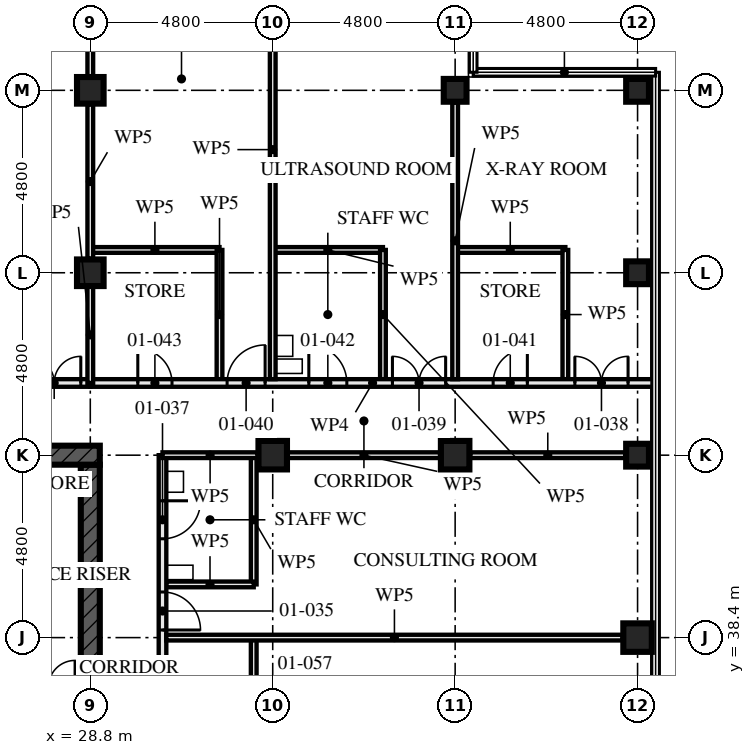
"""IFC4 building model, lengths in metres.
Left out: names, types, materials, properties, quantities, classifications, styles, units other than length and angle.
Written with IfcOpenShell. Run it as: python <this file> out.ifc"""

import sys

from ifc_helpers import new_model, si_unit, direction, frame, frame_2d, origin, origin_2d, place, context, subcontext, project, spatial, rectangle, hollow_rectangle, extrude, element, fill, save


model = new_model("IFC4")
c1 = context("Model", 3, precision=1e-05, world=origin(), true_north=direction((0.0, 1.0)))
c2 = subcontext(c1, "Body", "Model", "MODEL_VIEW")
j1 = project(units=[si_unit("LENGTHUNIT", "METRE"), si_unit("PLANEANGLEUNIT", "RADIAN")], contexts=[c1])
p1 = place(None, origin())
s1 = spatial("IfcSite", under=j1, at=p1, CompositionType="ELEMENT")
p2 = place(p1, origin())
s2 = spatial("IfcBuilding", under=s1, at=p2, CompositionType="ELEMENT")
p3 = place(p2, frame((0.0, 0.0, 4.5)))
s3 = spatial("IfcBuildingStorey", under=s2, at=p3, CompositionType="ELEMENT", Elevation=4.5)
for number, where, z_axis, x_axis in (
    (1, (28.8, 48.0, 0.0), (0.0, 0.0, 1.0), (1.0, 0.0, 0.0)),
    (2, (28.8, 52.8, 0.0), (0.0, 0.0, 1.0), (1.0, 0.0, 0.0)),
):
    element("IfcColumn", number, at=place(p3, frame(where, z_axis=z_axis, x_axis=x_axis)), inside=s3, PredefinedType="COLUMN", context=c2, shape_type="SweptSolid", body=[
        extrude(hollow_rectangle(XDim=0.7, YDim=0.7, WallThickness=0.06, at=origin_2d()), origin(), (0.0, 0.0, 1.0), 4.5),
    ])
for number, where, z_axis, x_axis in (
    (3, (33.6, 43.2, 0.0), (0.0, 0.0, 1.0), (0.0, 1.0, 0.0)),
    (4, (38.4, 43.2, 0.0), (0.0, 0.0, 1.0), (0.0, 1.0, 0.0)),
):
    element("IfcColumn", number, at=place(p3, frame(where, z_axis=z_axis, x_axis=x_axis)), inside=s3, PredefinedType="COLUMN", context=c2, shape_type="SweptSolid", body=[
        extrude(hollow_rectangle(XDim=0.75, YDim=0.75, WallThickness=0.08, at=origin_2d()), origin(), (0.0, 0.0, 1.0), 4.5),
    ])
p4 = place(p3, frame((38.4, 52.8, 0.0), z_axis=(0.0, 0.0, 1.0), x_axis=(0.0, 1.0, 0.0)))
e5 = element("IfcColumn", 5, at=p4, inside=s3, PredefinedType="COLUMN", context=c2, shape_type="SweptSolid", body=[
    extrude(hollow_rectangle(XDim=0.6, YDim=0.6, WallThickness=0.06, at=origin_2d()), origin(), (0.0, 0.0, 1.0), 4.5),
])
p5 = place(p3, frame((43.2, 38.4, 0.0), z_axis=(0.0, 0.0, 1.0), x_axis=(1.0, 0.0, 0.0)))
e6 = element("IfcColumn", 6, at=p5, inside=s3, PredefinedType="COLUMN", context=c2, shape_type="SweptSolid", body=[
    extrude(hollow_rectangle(XDim=0.75, YDim=0.75, WallThickness=0.08, at=origin_2d()), origin(), (0.0, 0.0, 1.0), 4.5),
])
for number, where, z_axis, x_axis in (
    (7, (43.2, 43.2, 0.0), (0.0, 0.0, 1.0), (0.0, 1.0, 0.0)),
    (8, (43.2, 48.0, 0.0), (0.0, 0.0, 1.0), (1.0, 0.0, 0.0)),
):
    element("IfcColumn", number, at=place(p3, frame(where, z_axis=z_axis, x_axis=x_axis)), inside=s3, PredefinedType="COLUMN", context=c2, shape_type="SweptSolid", body=[
        extrude(hollow_rectangle(XDim=0.6, YDim=0.6, WallThickness=0.08, at=origin_2d()), origin(), (0.0, 0.0, 1.0), 4.5),
    ])
p6 = place(p3, frame((43.2, 52.8, 0.0), z_axis=(0.0, 0.0, 1.0), x_axis=(0.0, 1.0, 0.0)))
e9 = element("IfcColumn", 9, at=p6, inside=s3, PredefinedType="COLUMN", context=c2, shape_type="SweptSolid", body=[
    extrude(hollow_rectangle(XDim=0.6, YDim=0.6, WallThickness=0.06, at=origin_2d()), origin(), (0.0, 0.0, 1.0), 4.5),
])
p7 = place(p3, frame((29.05, 43.2, -0.17), z_axis=(0.0, 0.0, 1.0), x_axis=(-1.0, 0.0, 0.0)))
e10 = element("IfcWall", 10, at=p7, inside=s3, PredefinedType="SHEAR", context=c2, shape_type="SweptSolid", body=[
    extrude(rectangle(XDim=14.9, YDim=0.5, at=frame_2d((7.45, 0.0))), origin(), (0.0, 0.0, 1.0), 4.5),
])
p8 = place(p7, frame((6.85, 0.0, 0.17)))
e11 = element("IfcOpeningElement", 11, at=p8, cuts=e10, PredefinedType="OPENING", context=c2, shape_type="SweptSolid", body=[
    extrude(rectangle(XDim=1.2, YDim=2.1, at=frame_2d((0.6, 1.05))), frame((0.0, 0.26, 0.0), z_axis=(0.0, -1.0, 0.0), x_axis=(1.0, 0.0, 0.0)), (0.0, 0.0, 1.0), 0.521),
])
p9 = place(p3, frame((28.8, 29.05, -0.17), z_axis=(0.0, 0.0, 1.0), x_axis=(0.0, 1.0, 0.0)))
e12 = element("IfcWall", 12, at=p9, inside=s3, PredefinedType="SHEAR", context=c2, shape_type="SweptSolid", body=[
    extrude(rectangle(XDim=13.9, YDim=0.5, at=frame_2d((6.95, 0.0))), origin(), (0.0, 0.0, 1.0), 4.5),
])
p10 = place(p9, frame((6.35, 0.0, 0.17)))
e13 = element("IfcOpeningElement", 13, at=p10, cuts=e12, PredefinedType="OPENING", context=c2, shape_type="SweptSolid", body=[
    extrude(rectangle(XDim=1.2, YDim=2.1, at=frame_2d((0.6, 1.05))), frame((0.0, 0.26, 0.0), z_axis=(0.0, -1.0, 0.0), x_axis=(1.0, 0.0, 0.0)), (0.0, 0.0, 1.0), 0.521),
])
p11 = place(p3, frame((28.8, 45.1, 0.0), z_axis=(0.0, 0.0, 1.0), x_axis=(-1.0, 0.0, 0.0)))
e14 = element("IfcWall", 14, at=p11, inside=s3, PredefinedType="PARTITIONING", context=c2, shape_type="SweptSolid", body=[
    extrude(rectangle(XDim=14.4, YDim=0.2, at=frame_2d((7.2, 0.0))), origin(), (0.0, 0.0, 1.0), 4.33),
])
p12 = place(p11, frame((0.25, 0.0, 0.0)))
e15 = element("IfcOpeningElement", 15, at=p12, cuts=e14, PredefinedType="OPENING", context=c2, shape_type="SweptSolid", body=[
    extrude(rectangle(XDim=1.4, YDim=2.4, at=frame_2d((0.7, 1.2))), frame((0.0, 0.111, 0.0), z_axis=(0.0, -1.0, 0.0), x_axis=(1.0, 0.0, 0.0)), (0.0, 0.0, 1.0), 0.221),
])
p13 = place(p11, frame((5.0, 0.0, 0.0)))
e16 = element("IfcOpeningElement", 16, at=p13, cuts=e14, PredefinedType="OPENING", context=c2, shape_type="SweptSolid", body=[
    extrude(rectangle(XDim=1.0, YDim=2.4, at=frame_2d((0.5, 1.2))), frame((0.0, 0.111, 0.0), z_axis=(0.0, -1.0, 0.0), x_axis=(1.0, 0.0, 0.0)), (0.0, 0.0, 1.0), 0.221),
])
p14 = place(p11, frame((9.8, 0.0, 0.0)))
e17 = element("IfcOpeningElement", 17, at=p14, cuts=e14, PredefinedType="OPENING", context=c2, shape_type="SweptSolid", body=[
    extrude(rectangle(XDim=1.0, YDim=2.4, at=frame_2d((0.5, 1.2))), frame((0.0, 0.111, 0.0), z_axis=(0.0, -1.0, 0.0), x_axis=(1.0, 0.0, 0.0)), (0.0, 0.0, 1.0), 0.221),
])
p15 = place(p11, frame((2.9, 0.0, 0.0)))
e18 = element("IfcOpeningElement", 18, at=p15, cuts=e14, PredefinedType="OPENING", context=c2, shape_type="SweptSolid", body=[
    extrude(rectangle(XDim=0.9, YDim=2.1, at=frame_2d((0.45, 1.05))), frame((0.0, 0.111, 0.0), z_axis=(0.0, -1.0, 0.0), x_axis=(1.0, 0.0, 0.0)), (0.0, 0.0, 1.0), 0.221),
])
p16 = place(p11, frame((7.4, 0.0, 0.0)))
e19 = element("IfcOpeningElement", 19, at=p16, cuts=e14, PredefinedType="OPENING", context=c2, shape_type="SweptSolid", body=[
    extrude(rectangle(XDim=1.0, YDim=2.1, at=frame_2d((0.5, 1.05))), frame((0.0, 0.111, 0.0), z_axis=(0.0, -1.0, 0.0), x_axis=(1.0, 0.0, 0.0)), (0.0, 0.0, 1.0), 0.221),
])
p17 = place(p11, frame((12.25, 0.0, 0.0)))
e20 = element("IfcOpeningElement", 20, at=p17, cuts=e14, PredefinedType="OPENING", context=c2, shape_type="SweptSolid", body=[
    extrude(rectangle(XDim=0.9, YDim=2.1, at=frame_2d((0.45, 1.05))), frame((0.0, 0.111, 0.0), z_axis=(0.0, -1.0, 0.0), x_axis=(1.0, 0.0, 0.0)), (0.0, 0.0, 1.0), 0.221),
])
p18 = place(p3, frame((33.1, 35.0, 0.0), z_axis=(0.0, 0.0, 1.0), x_axis=(0.0, 1.0, 0.0)))
e21 = element("IfcWall", 21, at=p18, inside=s3, PredefinedType="PARTITIONING", context=c2, shape_type="SweptSolid", body=[
    extrude(rectangle(XDim=3.4, YDim=0.15, at=frame_2d((1.7, 0.0))), origin(), (0.0, 0.0, 1.0), 4.33),
])
p19 = place(p3, frame((33.1, 39.8, 0.0), z_axis=(0.0, 0.0, 1.0), x_axis=(-1.0, 0.0, 0.0)))
e22 = element("IfcWall", 22, at=p19, inside=s3, PredefinedType="PARTITIONING", context=c2, shape_type="SweptSolid", body=[
    extrude(rectangle(XDim=2.3, YDim=0.15, at=frame_2d((1.15, 0.0))), origin(), (0.0, 0.0, 1.0), 4.33),
])
p20 = place(p3, frame((33.1, 39.8, 0.0), z_axis=(0.0, 0.0, 1.0), x_axis=(0.0, 1.0, 0.0)))
e23 = element("IfcWall", 23, at=p20, inside=s3, PredefinedType="PARTITIONING", context=c2, shape_type="SweptSolid", body=[
    extrude(rectangle(XDim=3.4, YDim=0.15, at=frame_2d((1.7, 0.0))), origin(), (0.0, 0.0, 1.0), 4.33),
])
p21 = place(p3, frame((42.805, 38.4, 0.0), z_axis=(0.0, 0.0, 1.0), x_axis=(-1.0, 0.0, 0.0)))
e24 = element("IfcWall", 24, at=p21, inside=s3, PredefinedType="PARTITIONING", context=c2, shape_type="SweptSolid", body=[
    extrude(rectangle(XDim=12.005, YDim=0.15, at=frame_2d((6.002, 0.0))), origin(), (0.0, 0.0, 1.0), 3.55),
])
p22 = place(p3, frame((30.7, 28.8, 0.0), z_axis=(0.0, 0.0, 1.0), x_axis=(0.0, 1.0, 0.0)))
e25 = element("IfcWall", 25, at=p22, inside=s3, PredefinedType="PARTITIONING", context=c2, shape_type="SweptSolid", body=[
    extrude(rectangle(XDim=14.4, YDim=0.2, at=frame_2d((7.2, 0.0))), origin(), (0.0, 0.0, 1.0), 3.55),
])
p23 = place(p22, frame((1.4, 0.0, 0.0)))
e26 = element("IfcOpeningElement", 26, at=p23, cuts=e25, PredefinedType="OPENING", context=c2, shape_type="SweptSolid", body=[
    extrude(rectangle(XDim=1.0, YDim=2.1, at=frame_2d((0.5, 1.05))), frame((0.0, 0.111, 0.0), z_axis=(0.0, -1.0, 0.0), x_axis=(1.0, 0.0, 0.0)), (0.0, 0.0, 1.0), 0.221),
])
p24 = place(p22, frame((3.6, 0.0, 0.0)))
e27 = element("IfcOpeningElement", 27, at=p24, cuts=e25, PredefinedType="OPENING", context=c2, shape_type="SweptSolid", body=[
    extrude(rectangle(XDim=1.0, YDim=2.4, at=frame_2d((0.5, 1.2))), frame((0.0, 0.111, 0.0), z_axis=(0.0, -1.0, 0.0), x_axis=(1.0, 0.0, 0.0)), (0.0, 0.0, 1.0), 0.221),
])
p25 = place(p22, frame((5.0, 0.0, 0.0)))
e28 = element("IfcOpeningElement", 28, at=p25, cuts=e25, PredefinedType="OPENING", context=c2, shape_type="SweptSolid", body=[
    extrude(rectangle(XDim=1.0, YDim=2.4, at=frame_2d((0.5, 1.2))), frame((0.0, 0.111, 0.0), z_axis=(0.0, -1.0, 0.0), x_axis=(1.0, 0.0, 0.0)), (0.0, 0.0, 1.0), 0.221),
])
p26 = place(p22, frame((9.8, 0.0, 0.0)))
e29 = element("IfcOpeningElement", 29, at=p26, cuts=e25, PredefinedType="OPENING", context=c2, shape_type="SweptSolid", body=[
    extrude(rectangle(XDim=1.0, YDim=2.4, at=frame_2d((0.5, 1.2))), frame((0.0, 0.111, 0.0), z_axis=(0.0, -1.0, 0.0), x_axis=(1.0, 0.0, 0.0)), (0.0, 0.0, 1.0), 0.221),
])
p27 = place(p22, frame((7.45, 0.0, 0.0)))
e30 = element("IfcOpeningElement", 30, at=p27, cuts=e25, PredefinedType="OPENING", context=c2, shape_type="SweptSolid", body=[
    extrude(rectangle(XDim=0.9, YDim=2.1, at=frame_2d((0.45, 1.05))), frame((0.0, 0.111, 0.0), z_axis=(0.0, -1.0, 0.0), x_axis=(1.0, 0.0, 0.0)), (0.0, 0.0, 1.0), 0.221),
])
p28 = place(p22, frame((12.2, 0.0, 0.0)))
e31 = element("IfcOpeningElement", 31, at=p28, cuts=e25, PredefinedType="OPENING", context=c2, shape_type="SweptSolid", body=[
    extrude(rectangle(XDim=1.0, YDim=2.1, at=frame_2d((0.5, 1.05))), frame((0.0, 0.111, 0.0), z_axis=(0.0, -1.0, 0.0), x_axis=(1.0, 0.0, 0.0)), (0.0, 0.0, 1.0), 0.221),
])
p29 = place(p3, frame((41.3, 48.6, 0.0), z_axis=(0.0, 0.0, 1.0), x_axis=(0.0, -1.0, 0.0)))
e32 = element("IfcWall", 32, at=p29, inside=s3, PredefinedType="PARTITIONING", context=c2, shape_type="SweptSolid", body=[
    extrude(rectangle(XDim=3.4, YDim=0.15, at=frame_2d((1.7, 0.0))), origin(), (0.0, 0.0, 1.0), 3.32),
])
p30 = place(p3, frame((41.3, 48.6, 0.0), z_axis=(0.0, 0.0, 1.0), x_axis=(-1.0, 0.0, 0.0)))
e33 = element("IfcWall", 33, at=p30, inside=s3, PredefinedType="PARTITIONING", context=c2, shape_type="SweptSolid", body=[
    extrude(rectangle(XDim=2.9, YDim=0.15, at=frame_2d((1.45, 0.0))), origin(), (0.0, 0.0, 1.0), 4.33),
])
p31 = place(p3, frame((36.5, 48.6, 0.0), z_axis=(0.0, 0.0, 1.0), x_axis=(0.0, -1.0, 0.0)))
e34 = element("IfcWall", 34, at=p31, inside=s3, PredefinedType="PARTITIONING", context=c2, shape_type="SweptSolid", body=[
    extrude(rectangle(XDim=3.4, YDim=0.15, at=frame_2d((1.7, 0.0))), origin(), (0.0, 0.0, 1.0), 3.32),
])
p32 = place(p3, frame((36.5, 48.6, 0.0), z_axis=(0.0, 0.0, 1.0), x_axis=(-1.0, 0.0, 0.0)))
e35 = element("IfcWall", 35, at=p32, inside=s3, PredefinedType="PARTITIONING", context=c2, shape_type="SweptSolid", body=[
    extrude(rectangle(XDim=2.9, YDim=0.15, at=frame_2d((1.45, 0.0))), origin(), (0.0, 0.0, 1.0), 4.33),
])
p33 = place(p3, frame((32.2, 48.6, 0.0), z_axis=(0.0, 0.0, 1.0), x_axis=(0.0, -1.0, 0.0)))
e36 = element("IfcWall", 36, at=p33, inside=s3, PredefinedType="PARTITIONING", context=c2, shape_type="SweptSolid", body=[
    extrude(rectangle(XDim=3.4, YDim=0.15, at=frame_2d((1.7, 0.0))), origin(), (0.0, 0.0, 1.0), 3.32),
])
p34 = place(p3, frame((32.2, 48.6, 0.0), z_axis=(0.0, 0.0, 1.0), x_axis=(-1.0, 0.0, 0.0)))
e37 = element("IfcWall", 37, at=p34, inside=s3, PredefinedType="PARTITIONING", context=c2, shape_type="SweptSolid", body=[
    extrude(rectangle(XDim=3.4, YDim=0.15, at=frame_2d((1.7, 0.0))), origin(), (0.0, 0.0, 1.0), 4.33),
])
p35 = place(p3, frame((38.4, 52.48, 0.0), z_axis=(0.0, 0.0, 1.0), x_axis=(0.0, -1.0, 0.0)))
e38 = element("IfcWall", 38, at=p35, inside=s3, PredefinedType="PARTITIONING", context=c2, shape_type="SweptSolid", body=[
    extrude(rectangle(XDim=7.28, YDim=0.15, at=frame_2d((3.64, 0.0))), origin(), (0.0, 0.0, 1.0), 3.32),
])
p36 = place(p3, frame((33.6, 57.28, 0.0), z_axis=(0.0, 0.0, 1.0), x_axis=(0.0, -1.0, 0.0)))
e39 = element("IfcWall", 39, at=p36, inside=s3, PredefinedType="PARTITIONING", context=c2, shape_type="SweptSolid", body=[
    extrude(rectangle(XDim=12.08, YDim=0.15, at=frame_2d((6.04, 0.0))), origin(), (0.0, 0.0, 1.0), 3.32),
])
p37 = place(p3, frame((43.655, 45.1, 0.0), z_axis=(0.0, 0.0, 1.0), x_axis=(-1.0, 0.0, 0.0)))
e40 = element("IfcWall", 40, at=p37, inside=s3, PredefinedType="PARTITIONING", context=c2, shape_type="SweptSolid", body=[
    extrude(rectangle(XDim=14.855, YDim=0.2, at=frame_2d((7.427, 0.0))), origin(), (0.0, 0.0, 1.0), 3.32),
])
p38 = place(p37, frame((0.705, 0.0, 0.0)))
e41 = element("IfcOpeningElement", 41, at=p38, cuts=e40, PredefinedType="OPENING", context=c2, shape_type="SweptSolid", body=[
    extrude(rectangle(XDim=1.4, YDim=2.4, at=frame_2d((0.7, 1.2))), frame((0.0, 0.111, 0.0), z_axis=(0.0, -1.0, 0.0), x_axis=(1.0, 0.0, 0.0)), (0.0, 0.0, 1.0), 0.221),
])
p39 = place(p37, frame((5.505, 0.0, 0.0)))
e42 = element("IfcOpeningElement", 42, at=p39, cuts=e40, PredefinedType="OPENING", context=c2, shape_type="SweptSolid", body=[
    extrude(rectangle(XDim=1.4, YDim=2.4, at=frame_2d((0.7, 1.2))), frame((0.0, 0.111, 0.0), z_axis=(0.0, -1.0, 0.0), x_axis=(1.0, 0.0, 0.0)), (0.0, 0.0, 1.0), 0.221),
])
p40 = place(p37, frame((10.255, 0.0, 0.0)))
e43 = element("IfcOpeningElement", 43, at=p40, cuts=e40, PredefinedType="OPENING", context=c2, shape_type="SweptSolid", body=[
    extrude(rectangle(XDim=1.0, YDim=2.4, at=frame_2d((0.5, 1.2))), frame((0.0, 0.111, 0.0), z_axis=(0.0, -1.0, 0.0), x_axis=(1.0, 0.0, 0.0)), (0.0, 0.0, 1.0), 0.221),
])
p41 = place(p37, frame((3.355, 0.0, 0.0)))
e44 = element("IfcOpeningElement", 44, at=p41, cuts=e40, PredefinedType="OPENING", context=c2, shape_type="SweptSolid", body=[
    extrude(rectangle(XDim=0.9, YDim=2.1, at=frame_2d((0.45, 1.05))), frame((0.0, 0.111, 0.0), z_axis=(0.0, -1.0, 0.0), x_axis=(1.0, 0.0, 0.0)), (0.0, 0.0, 1.0), 0.221),
])
p42 = place(p37, frame((8.105, 0.0, 0.0)))
e45 = element("IfcOpeningElement", 45, at=p42, cuts=e40, PredefinedType="OPENING", context=c2, shape_type="SweptSolid", body=[
    extrude(rectangle(XDim=1.0, YDim=2.1, at=frame_2d((0.5, 1.05))), frame((0.0, 0.111, 0.0), z_axis=(0.0, -1.0, 0.0), x_axis=(1.0, 0.0, 0.0)), (0.0, 0.0, 1.0), 0.221),
])
p43 = place(p37, frame((12.705, 0.0, 0.0)))
e46 = element("IfcOpeningElement", 46, at=p43, cuts=e40, PredefinedType="OPENING", context=c2, shape_type="SweptSolid", body=[
    extrude(rectangle(XDim=0.9, YDim=2.1, at=frame_2d((0.45, 1.05))), frame((0.0, 0.111, 0.0), z_axis=(0.0, -1.0, 0.0), x_axis=(1.0, 0.0, 0.0)), (0.0, 0.0, 1.0), 0.221),
])
p44 = place(p3, frame((28.8, 45.1, 0.0), z_axis=(0.0, 0.0, 1.0), x_axis=(0.0, 1.0, 0.0)))
e47 = element("IfcWall", 47, at=p44, inside=s3, PredefinedType="PARTITIONING", context=c2, shape_type="SweptSolid", body=[
    extrude(rectangle(XDim=2.53, YDim=0.15, at=frame_2d((1.265, 0.0))), origin(), (0.0, 0.0, 1.0), 3.32),
])
p45 = place(p3, frame((28.8, 48.37, 0.0), z_axis=(0.0, 0.0, 1.0), x_axis=(0.0, 1.0, 0.0)))
e48 = element("IfcWall", 48, at=p45, inside=s3, PredefinedType="PARTITIONING", context=c2, shape_type="SweptSolid", body=[
    extrude(rectangle(XDim=4.06, YDim=0.15, at=frame_2d((2.03, 0.0))), origin(), (0.0, 0.0, 1.0), 3.32),
])
p46 = place(p3, frame((28.8, 53.17, 0.0), z_axis=(0.0, 0.0, 1.0), x_axis=(0.0, 1.0, 0.0)))
e49 = element("IfcWall", 49, at=p46, inside=s3, PredefinedType="PARTITIONING", context=c2, shape_type="SweptSolid", body=[
    extrude(rectangle(XDim=4.11, YDim=0.15, at=frame_2d((2.055, 0.0))), origin(), (0.0, 0.0, 1.0), 3.32),
])
p47 = place(p3, frame((42.88, 43.2, 0.0), z_axis=(0.0, 0.0, 1.0), x_axis=(-1.0, 0.0, 0.0)))
e50 = element("IfcWall", 50, at=p47, inside=s3, PredefinedType="PARTITIONING", context=c2, shape_type="SweptSolid", body=[
    extrude(rectangle(XDim=4.085, YDim=0.15, at=frame_2d((2.042, 0.0))), origin(), (0.0, 0.0, 1.0), 3.32),
])
p48 = place(p3, frame((38.005, 43.2, 0.0), z_axis=(0.0, 0.0, 1.0), x_axis=(-1.0, 0.0, 0.0)))
e51 = element("IfcWall", 51, at=p48, inside=s3, PredefinedType="PARTITIONING", context=c2, shape_type="SweptSolid", body=[
    extrude(rectangle(XDim=4.01, YDim=0.15, at=frame_2d((2.005, 0.0))), origin(), (0.0, 0.0, 1.0), 3.32),
])
p49 = place(p3, frame((33.205, 43.2, 0.0), z_axis=(0.0, 0.0, 1.0), x_axis=(-1.0, 0.0, 0.0)))
e52 = element("IfcWall", 52, at=p49, inside=s3, PredefinedType="PARTITIONING", context=c2, shape_type="SweptSolid", body=[
    extrude(rectangle(XDim=2.505, YDim=0.15, at=frame_2d((1.252, 0.0))), origin(), (0.0, 0.0, 1.0), 3.32),
])
p50 = place(p12, frame((1.4, 0.0, 0.0), z_axis=(0.0, 0.0, 1.0), x_axis=(-1.0, 0.0, 0.0)))
e53 = element("IfcDoor", 53, at=p50, inside=s3, OperationType="DOUBLE_DOOR_SINGLE_SWING", PredefinedType="DOOR", context=c2, shape_type="SweptSolid", body=[
    extrude(rectangle(XDim=1.4, YDim=2.4, at=frame_2d((0.7, 1.2))), frame((0.0, 0.027, 0.0), z_axis=(0.0, -1.0, 0.0), x_axis=(1.0, 0.0, 0.0)), (0.0, 0.0, 1.0), 0.054),
])
fill(e15, e53)
p51 = place(p26, frame((1.0, 0.0, 0.0), z_axis=(0.0, 0.0, 1.0), x_axis=(-1.0, 0.0, 0.0)))
e54 = element("IfcDoor", 54, at=p51, inside=s3, OperationType="SINGLE_SWING_LEFT", PredefinedType="DOOR", context=c2, shape_type="SweptSolid", body=[
    extrude(rectangle(XDim=1.0, YDim=2.4, at=frame_2d((0.5, 1.2))), frame((0.0, 0.027, 0.0), z_axis=(0.0, -1.0, 0.0), x_axis=(1.0, 0.0, 0.0)), (0.0, 0.0, 1.0), 0.054),
])
fill(e29, e54)
p52 = place(p28, frame((1.0, 0.0, 0.0), z_axis=(0.0, 0.0, 1.0), x_axis=(-1.0, 0.0, 0.0)))
e55 = element("IfcDoor", 55, at=p52, inside=s3, OperationType="SINGLE_SWING_RIGHT", PredefinedType="DOOR", context=c2, shape_type="SweptSolid", body=[
    extrude(rectangle(XDim=1.0, YDim=2.1, at=frame_2d((0.5, 1.05))), frame((0.0, 0.027, 0.0), z_axis=(0.0, -1.0, 0.0), x_axis=(1.0, 0.0, 0.0)), (0.0, 0.0, 1.0), 0.054),
])
fill(e31, e55)
p53 = place(p38, frame((1.4, 0.0, 0.0), z_axis=(0.0, 0.0, 1.0), x_axis=(-1.0, 0.0, 0.0)))
e56 = element("IfcDoor", 56, at=p53, inside=s3, OperationType="DOUBLE_DOOR_SINGLE_SWING", PredefinedType="DOOR", context=c2, shape_type="SweptSolid", body=[
    extrude(rectangle(XDim=1.4, YDim=2.4, at=frame_2d((0.7, 1.2))), frame((0.0, 0.027, 0.0), z_axis=(0.0, -1.0, 0.0), x_axis=(1.0, 0.0, 0.0)), (0.0, 0.0, 1.0), 0.054),
])
fill(e41, e56)
p54 = place(p39, frame((1.4, 0.0, 0.0), z_axis=(0.0, 0.0, 1.0), x_axis=(-1.0, 0.0, 0.0)))
e57 = element("IfcDoor", 57, at=p54, inside=s3, OperationType="DOUBLE_DOOR_SINGLE_SWING", PredefinedType="DOOR", context=c2, shape_type="SweptSolid", body=[
    extrude(rectangle(XDim=1.4, YDim=2.4, at=frame_2d((0.7, 1.2))), frame((0.0, 0.027, 0.0), z_axis=(0.0, -1.0, 0.0), x_axis=(1.0, 0.0, 0.0)), (0.0, 0.0, 1.0), 0.054),
])
fill(e42, e57)
p55 = place(p40, frame((1.0, 0.0, 0.0), z_axis=(0.0, 0.0, 1.0), x_axis=(-1.0, 0.0, 0.0)))
e58 = element("IfcDoor", 58, at=p55, inside=s3, OperationType="SINGLE_SWING_LEFT", PredefinedType="DOOR", context=c2, shape_type="SweptSolid", body=[
    extrude(rectangle(XDim=1.0, YDim=2.4, at=frame_2d((0.5, 1.2))), frame((0.0, 0.027, 0.0), z_axis=(0.0, -1.0, 0.0), x_axis=(1.0, 0.0, 0.0)), (0.0, 0.0, 1.0), 0.054),
])
fill(e43, e58)
p56 = place(p41, frame((0.9, 0.0, 0.0), z_axis=(0.0, 0.0, 1.0), x_axis=(-1.0, 0.0, 0.0)))
e59 = element("IfcDoor", 59, at=p56, inside=s3, OperationType="SINGLE_SWING_LEFT", PredefinedType="DOOR", context=c2, shape_type="SweptSolid", body=[
    extrude(rectangle(XDim=0.9, YDim=2.1, at=frame_2d((0.45, 1.05))), frame((0.0, 0.027, 0.0), z_axis=(0.0, -1.0, 0.0), x_axis=(1.0, 0.0, 0.0)), (0.0, 0.0, 1.0), 0.054),
])
fill(e44, e59)
p57 = place(p42, frame((1.0, 0.0, 0.0), z_axis=(0.0, 0.0, 1.0), x_axis=(-1.0, 0.0, 0.0)))
e60 = element("IfcDoor", 60, at=p57, inside=s3, OperationType="SINGLE_SWING_RIGHT", PredefinedType="DOOR", context=c2, shape_type="SweptSolid", body=[
    extrude(rectangle(XDim=1.0, YDim=2.1, at=frame_2d((0.5, 1.05))), frame((0.0, 0.027, 0.0), z_axis=(0.0, -1.0, 0.0), x_axis=(1.0, 0.0, 0.0)), (0.0, 0.0, 1.0), 0.054),
])
fill(e45, e60)
p58 = place(p43, frame((0.9, 0.0, 0.0), z_axis=(0.0, 0.0, 1.0), x_axis=(-1.0, 0.0, 0.0)))
e61 = element("IfcDoor", 61, at=p58, inside=s3, OperationType="SINGLE_SWING_RIGHT", PredefinedType="DOOR", context=c2, shape_type="SweptSolid", body=[
    extrude(rectangle(XDim=0.9, YDim=2.1, at=frame_2d((0.45, 1.05))), frame((0.0, 0.027, 0.0), z_axis=(0.0, -1.0, 0.0), x_axis=(1.0, 0.0, 0.0)), (0.0, 0.0, 1.0), 0.054),
])
fill(e46, e61)
save(model, sys.argv[1])
